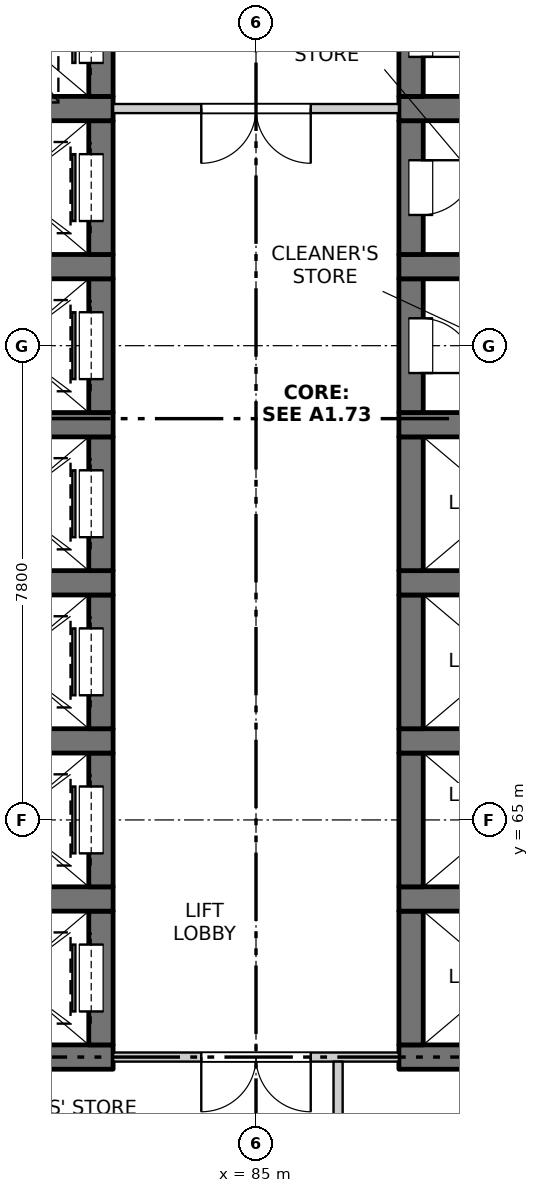
"""IFC4 building model, lengths in metres.
Left out: names, types, materials, properties, quantities, classifications, styles, units other than length and angle.
Written with IfcOpenShell. Run it as: python <this file> out.ifc"""

import sys

from ifc_helpers import new_model, si_unit, direction, frame, frame_2d, origin, place, context, subcontext, project, spatial, rectangle, extrude, element, fill, save


model = new_model("IFC4")
c1 = context("Model", 3, precision=1e-05, world=origin(), true_north=direction((0.0, 1.0)))
c2 = subcontext(c1, "Body", "Model", "MODEL_VIEW")
j1 = project(units=[si_unit("LENGTHUNIT", "METRE"), si_unit("PLANEANGLEUNIT", "RADIAN")], contexts=[c1])
p1 = place(None, origin())
s1 = spatial("IfcSite", under=j1, at=p1, CompositionType="ELEMENT")
p2 = place(p1, origin())
s2 = spatial("IfcBuilding", under=s1, at=p2, CompositionType="ELEMENT")
p3 = place(p2, frame((0.0, 0.0, 19.5)))
s3 = spatial("IfcBuildingStorey", under=s2, at=p3, CompositionType="ELEMENT", Elevation=19.5)
p4 = place(p3, frame((79.65, 61.1, -0.25), z_axis=(0.0, 0.0, 1.0), x_axis=(1.0, 0.0, 0.0)))
e1 = element("IfcWall", 1, at=p4, inside=s3, PredefinedType="SOLIDWALL", context=c2, shape_type="SweptSolid", body=[
    extrude(rectangle(XDim=3.0, YDim=0.4, at=frame_2d((1.5, 0.0))), origin(), (0.0, 0.0, 1.0), 3.4),
])
p5 = place(p3, frame((82.45, 61.3, -0.25), z_axis=(0.0, 0.0, 1.0), x_axis=(0.0, 1.0, 0.0)))
e2 = element("IfcWall", 2, at=p5, inside=s3, PredefinedType="SOLIDWALL", context=c2, shape_type="SweptSolid", body=[
    extrude(rectangle(XDim=2.2, YDim=0.4, at=frame_2d((1.1, 0.0))), origin(), (0.0, 0.0, 1.0), 3.4),
])
p6 = place(p5, frame((0.55, 0.0, 0.25)))
e3 = element("IfcOpeningElement", 3, at=p6, cuts=e2, PredefinedType="OPENING", context=c2, shape_type="SweptSolid", body=[
    extrude(rectangle(XDim=1.1, YDim=2.1, at=frame_2d((0.55, 1.05))), frame((0.0, 0.21, 0.0), z_axis=(0.0, -1.0, 0.0), x_axis=(1.0, 0.0, 0.0)), (0.0, 0.0, 1.0), 0.42),
])
p7 = place(p3, frame((79.65, 63.7, -0.25), z_axis=(0.0, 0.0, 1.0), x_axis=(1.0, 0.0, 0.0)))
e4 = element("IfcWall", 4, at=p7, inside=s3, PredefinedType="SOLIDWALL", context=c2, shape_type="SweptSolid", body=[
    extrude(rectangle(XDim=3.0, YDim=0.4, at=frame_2d((1.5, 0.0))), origin(), (0.0, 0.0, 1.0), 3.4),
])
p8 = place(p3, frame((82.45, 63.9, -0.25), z_axis=(0.0, 0.0, 1.0), x_axis=(0.0, 1.0, 0.0)))
e5 = element("IfcWall", 5, at=p8, inside=s3, PredefinedType="SOLIDWALL", context=c2, shape_type="SweptSolid", body=[
    extrude(rectangle(XDim=2.2, YDim=0.4, at=frame_2d((1.1, 0.0))), origin(), (0.0, 0.0, 1.0), 3.4),
])
p9 = place(p8, frame((0.55, 0.0, 0.25)))
e6 = element("IfcOpeningElement", 6, at=p9, cuts=e5, PredefinedType="OPENING", context=c2, shape_type="SweptSolid", body=[
    extrude(rectangle(XDim=1.1, YDim=2.1, at=frame_2d((0.55, 1.05))), frame((0.0, 0.21, 0.0), z_axis=(0.0, -1.0, 0.0), x_axis=(1.0, 0.0, 0.0)), (0.0, 0.0, 1.0), 0.42),
])
p10 = place(p3, frame((79.65, 66.3, -0.25), z_axis=(0.0, 0.0, 1.0), x_axis=(1.0, 0.0, 0.0)))
e7 = element("IfcWall", 7, at=p10, inside=s3, PredefinedType="SOLIDWALL", context=c2, shape_type="SweptSolid", body=[
    extrude(rectangle(XDim=3.0, YDim=0.4, at=frame_2d((1.5, 0.0))), origin(), (0.0, 0.0, 1.0), 3.4),
])
p11 = place(p3, frame((82.45, 66.5, -0.25), z_axis=(0.0, 0.0, 1.0), x_axis=(0.0, 1.0, 0.0)))
e8 = element("IfcWall", 8, at=p11, inside=s3, PredefinedType="SOLIDWALL", context=c2, shape_type="SweptSolid", body=[
    extrude(rectangle(XDim=2.2, YDim=0.4, at=frame_2d((1.1, 0.0))), origin(), (0.0, 0.0, 1.0), 3.4),
])
p12 = place(p11, frame((0.55, 0.0, 0.25)))
e9 = element("IfcOpeningElement", 9, at=p12, cuts=e8, PredefinedType="OPENING", context=c2, shape_type="SweptSolid", body=[
    extrude(rectangle(XDim=1.1, YDim=2.1, at=frame_2d((0.55, 1.05))), frame((0.0, 0.21, 0.0), z_axis=(0.0, -1.0, 0.0), x_axis=(1.0, 0.0, 0.0)), (0.0, 0.0, 1.0), 0.42),
])
p13 = place(p3, frame((79.65, 68.9, -0.25), z_axis=(0.0, 0.0, 1.0), x_axis=(1.0, 0.0, 0.0)))
e10 = element("IfcWall", 10, at=p13, inside=s3, PredefinedType="SOLIDWALL", context=c2, shape_type="SweptSolid", body=[
    extrude(rectangle(XDim=3.0, YDim=0.4, at=frame_2d((1.5, 0.0))), origin(), (0.0, 0.0, 1.0), 3.4),
])
p14 = place(p3, frame((82.45, 69.1, -0.25), z_axis=(0.0, 0.0, 1.0), x_axis=(0.0, 1.0, 0.0)))
e11 = element("IfcWall", 11, at=p14, inside=s3, PredefinedType="SOLIDWALL", context=c2, shape_type="SweptSolid", body=[
    extrude(rectangle(XDim=2.2, YDim=0.4, at=frame_2d((1.1, 0.0))), origin(), (0.0, 0.0, 1.0), 3.4),
])
p15 = place(p14, frame((0.55, 0.0, 0.25)))
e12 = element("IfcOpeningElement", 12, at=p15, cuts=e11, PredefinedType="OPENING", context=c2, shape_type="SweptSolid", body=[
    extrude(rectangle(XDim=1.1, YDim=2.1, at=frame_2d((0.55, 1.05))), frame((0.0, 0.21, 0.0), z_axis=(0.0, -1.0, 0.0), x_axis=(1.0, 0.0, 0.0)), (0.0, 0.0, 1.0), 0.42),
])
p16 = place(p3, frame((79.65, 71.5, -0.25), z_axis=(0.0, 0.0, 1.0), x_axis=(1.0, 0.0, 0.0)))
e13 = element("IfcWall", 13, at=p16, inside=s3, PredefinedType="SOLIDWALL", context=c2, shape_type="SweptSolid", body=[
    extrude(rectangle(XDim=3.0, YDim=0.4, at=frame_2d((1.5, 0.0))), origin(), (0.0, 0.0, 1.0), 3.4),
])
p17 = place(p3, frame((82.45, 71.7, -0.25), z_axis=(0.0, 0.0, 1.0), x_axis=(0.0, 1.0, 0.0)))
e14 = element("IfcWall", 14, at=p17, inside=s3, PredefinedType="SOLIDWALL", context=c2, shape_type="SweptSolid", body=[
    extrude(rectangle(XDim=2.2, YDim=0.4, at=frame_2d((1.1, 0.0))), origin(), (0.0, 0.0, 1.0), 3.4),
])
p18 = place(p17, frame((0.55, 0.0, 0.25)))
e15 = element("IfcOpeningElement", 15, at=p18, cuts=e14, PredefinedType="OPENING", context=c2, shape_type="SweptSolid", body=[
    extrude(rectangle(XDim=1.1, YDim=2.1, at=frame_2d((0.55, 1.05))), frame((0.0, 0.21, 0.0), z_axis=(0.0, -1.0, 0.0), x_axis=(1.0, 0.0, 0.0)), (0.0, 0.0, 1.0), 0.42),
])
p19 = place(p3, frame((79.65, 74.1, -0.25), z_axis=(0.0, 0.0, 1.0), x_axis=(1.0, 0.0, 0.0)))
e16 = element("IfcWall", 16, at=p19, inside=s3, PredefinedType="SOLIDWALL", context=c2, shape_type="SweptSolid", body=[
    extrude(rectangle(XDim=3.0, YDim=0.4, at=frame_2d((1.5, 0.0))), origin(), (0.0, 0.0, 1.0), 3.4),
])
p20 = place(p3, frame((82.45, 74.3, -0.25), z_axis=(0.0, 0.0, 1.0), x_axis=(0.0, 1.0, 0.0)))
e17 = element("IfcWall", 17, at=p20, inside=s3, PredefinedType="SOLIDWALL", context=c2, shape_type="SweptSolid", body=[
    extrude(rectangle(XDim=2.2, YDim=0.4, at=frame_2d((1.1, 0.0))), origin(), (0.0, 0.0, 1.0), 3.4),
])
p21 = place(p20, frame((0.55, 0.0, 0.25)))
e18 = element("IfcOpeningElement", 18, at=p21, cuts=e17, PredefinedType="OPENING", context=c2, shape_type="SweptSolid", body=[
    extrude(rectangle(XDim=1.1, YDim=2.1, at=frame_2d((0.55, 1.05))), frame((0.0, 0.21, 0.0), z_axis=(0.0, -1.0, 0.0), x_axis=(1.0, 0.0, 0.0)), (0.0, 0.0, 1.0), 0.42),
])
p22 = place(p3, frame((79.65, 76.7, -0.25), z_axis=(0.0, 0.0, 1.0), x_axis=(1.0, 0.0, 0.0)))
e19 = element("IfcWall", 19, at=p22, inside=s3, PredefinedType="SOLIDWALL", context=c2, shape_type="SweptSolid", body=[
    extrude(rectangle(XDim=3.0, YDim=0.4, at=frame_2d((1.5, 0.0))), origin(), (0.0, 0.0, 1.0), 3.4),
])
p23 = place(p3, frame((82.45, 76.9, -0.25), z_axis=(0.0, 0.0, 1.0), x_axis=(0.0, 1.0, 0.0)))
e20 = element("IfcWall", 20, at=p23, inside=s3, PredefinedType="SOLIDWALL", context=c2, shape_type="SweptSolid", body=[
    extrude(rectangle(XDim=2.2, YDim=0.4, at=frame_2d((1.1, 0.0))), origin(), (0.0, 0.0, 1.0), 3.4),
])
p24 = place(p23, frame((0.55, 0.0, 0.25)))
e21 = element("IfcOpeningElement", 21, at=p24, cuts=e20, PredefinedType="OPENING", context=c2, shape_type="SweptSolid", body=[
    extrude(rectangle(XDim=1.1, YDim=2.1, at=frame_2d((0.55, 1.05))), frame((0.0, 0.21, 0.0), z_axis=(0.0, -1.0, 0.0), x_axis=(1.0, 0.0, 0.0)), (0.0, 0.0, 1.0), 0.42),
])
p25 = place(p3, frame((87.35, 61.1, -0.25), z_axis=(0.0, 0.0, 1.0), x_axis=(1.0, 0.0, 0.0)))
e22 = element("IfcWall", 22, at=p25, inside=s3, PredefinedType="SOLIDWALL", context=c2, shape_type="SweptSolid", body=[
    extrude(rectangle(XDim=3.0, YDim=0.4, at=frame_2d((1.5, 0.0))), origin(), (0.0, 0.0, 1.0), 3.4),
])
p26 = place(p3, frame((87.55, 61.3, -0.25), z_axis=(0.0, 0.0, 1.0), x_axis=(0.0, 1.0, 0.0)))
e23 = element("IfcWall", 23, at=p26, inside=s3, PredefinedType="SOLIDWALL", context=c2, shape_type="SweptSolid", body=[
    extrude(rectangle(XDim=2.2, YDim=0.4, at=frame_2d((1.1, 0.0))), origin(), (0.0, 0.0, 1.0), 3.4),
])
p27 = place(p3, frame((87.35, 63.7, -0.25), z_axis=(0.0, 0.0, 1.0), x_axis=(1.0, 0.0, 0.0)))
e24 = element("IfcWall", 24, at=p27, inside=s3, PredefinedType="SOLIDWALL", context=c2, shape_type="SweptSolid", body=[
    extrude(rectangle(XDim=3.0, YDim=0.4, at=frame_2d((1.5, 0.0))), origin(), (0.0, 0.0, 1.0), 3.4),
])
p28 = place(p3, frame((87.55, 63.9, -0.25), z_axis=(0.0, 0.0, 1.0), x_axis=(0.0, 1.0, 0.0)))
e25 = element("IfcWall", 25, at=p28, inside=s3, PredefinedType="SOLIDWALL", context=c2, shape_type="SweptSolid", body=[
    extrude(rectangle(XDim=2.2, YDim=0.4, at=frame_2d((1.1, 0.0))), origin(), (0.0, 0.0, 1.0), 3.4),
])
p29 = place(p3, frame((87.35, 66.3, -0.25), z_axis=(0.0, 0.0, 1.0), x_axis=(1.0, 0.0, 0.0)))
e26 = element("IfcWall", 26, at=p29, inside=s3, PredefinedType="SOLIDWALL", context=c2, shape_type="SweptSolid", body=[
    extrude(rectangle(XDim=3.0, YDim=0.4, at=frame_2d((1.5, 0.0))), origin(), (0.0, 0.0, 1.0), 3.4),
])
p30 = place(p3, frame((87.55, 66.5, -0.25), z_axis=(0.0, 0.0, 1.0), x_axis=(0.0, 1.0, 0.0)))
e27 = element("IfcWall", 27, at=p30, inside=s3, PredefinedType="SOLIDWALL", context=c2, shape_type="SweptSolid", body=[
    extrude(rectangle(XDim=2.2, YDim=0.4, at=frame_2d((1.1, 0.0))), origin(), (0.0, 0.0, 1.0), 3.4),
])
p31 = place(p3, frame((87.35, 68.9, -0.25), z_axis=(0.0, 0.0, 1.0), x_axis=(1.0, 0.0, 0.0)))
e28 = element("IfcWall", 28, at=p31, inside=s3, PredefinedType="SOLIDWALL", context=c2, shape_type="SweptSolid", body=[
    extrude(rectangle(XDim=3.0, YDim=0.4, at=frame_2d((1.5, 0.0))), origin(), (0.0, 0.0, 1.0), 3.4),
])
p32 = place(p3, frame((87.55, 69.1, -0.25), z_axis=(0.0, 0.0, 1.0), x_axis=(0.0, 1.0, 0.0)))
e29 = element("IfcWall", 29, at=p32, inside=s3, PredefinedType="SOLIDWALL", context=c2, shape_type="SweptSolid", body=[
    extrude(rectangle(XDim=2.2, YDim=0.4, at=frame_2d((1.1, 0.0))), origin(), (0.0, 0.0, 1.0), 3.4),
])
p33 = place(p3, frame((87.35, 71.5, -0.25), z_axis=(0.0, 0.0, 1.0), x_axis=(1.0, 0.0, 0.0)))
e30 = element("IfcWall", 30, at=p33, inside=s3, PredefinedType="SOLIDWALL", context=c2, shape_type="SweptSolid", body=[
    extrude(rectangle(XDim=3.0, YDim=0.4, at=frame_2d((1.5, 0.0))), origin(), (0.0, 0.0, 1.0), 3.4),
])
p34 = place(p3, frame((87.55, 71.7, -0.25), z_axis=(0.0, 0.0, 1.0), x_axis=(0.0, 1.0, 0.0)))
e31 = element("IfcWall", 31, at=p34, inside=s3, PredefinedType="SOLIDWALL", context=c2, shape_type="SweptSolid", body=[
    extrude(rectangle(XDim=2.2, YDim=0.4, at=frame_2d((1.1, 0.0))), origin(), (0.0, 0.0, 1.0), 3.4),
])
p35 = place(p34, frame((0.65, 0.0, 0.25)))
e32 = element("IfcOpeningElement", 32, at=p35, cuts=e31, PredefinedType="OPENING", context=c2, shape_type="SweptSolid", body=[
    extrude(rectangle(XDim=0.9, YDim=2.1, at=frame_2d((0.45, 1.05))), frame((0.0, 0.21, 0.0), z_axis=(0.0, -1.0, 0.0), x_axis=(1.0, 0.0, 0.0)), (0.0, 0.0, 1.0), 0.42),
])
p36 = place(p3, frame((87.35, 74.1, -0.25), z_axis=(0.0, 0.0, 1.0), x_axis=(1.0, 0.0, 0.0)))
e33 = element("IfcWall", 33, at=p36, inside=s3, PredefinedType="SOLIDWALL", context=c2, shape_type="SweptSolid", body=[
    extrude(rectangle(XDim=3.0, YDim=0.4, at=frame_2d((1.5, 0.0))), origin(), (0.0, 0.0, 1.0), 3.4),
])
p37 = place(p3, frame((87.55, 74.3, -0.25), z_axis=(0.0, 0.0, 1.0), x_axis=(0.0, 1.0, 0.0)))
e34 = element("IfcWall", 34, at=p37, inside=s3, PredefinedType="SOLIDWALL", context=c2, shape_type="SweptSolid", body=[
    extrude(rectangle(XDim=2.2, YDim=0.4, at=frame_2d((1.1, 0.0))), origin(), (0.0, 0.0, 1.0), 3.4),
])
p38 = place(p37, frame((0.65, 0.0, 0.25)))
e35 = element("IfcOpeningElement", 35, at=p38, cuts=e34, PredefinedType="OPENING", context=c2, shape_type="SweptSolid", body=[
    extrude(rectangle(XDim=0.9, YDim=2.1, at=frame_2d((0.45, 1.05))), frame((0.0, 0.21, 0.0), z_axis=(0.0, -1.0, 0.0), x_axis=(1.0, 0.0, 0.0)), (0.0, 0.0, 1.0), 0.42),
])
p39 = place(p3, frame((87.35, 76.7, -0.25), z_axis=(0.0, 0.0, 1.0), x_axis=(1.0, 0.0, 0.0)))
e36 = element("IfcWall", 36, at=p39, inside=s3, PredefinedType="SOLIDWALL", context=c2, shape_type="SweptSolid", body=[
    extrude(rectangle(XDim=3.0, YDim=0.4, at=frame_2d((1.5, 0.0))), origin(), (0.0, 0.0, 1.0), 3.4),
])
p40 = place(p3, frame((87.55, 76.9, -0.25), z_axis=(0.0, 0.0, 1.0), x_axis=(0.0, 1.0, 0.0)))
e37 = element("IfcWall", 37, at=p40, inside=s3, PredefinedType="SOLIDWALL", context=c2, shape_type="SweptSolid", body=[
    extrude(rectangle(XDim=2.2, YDim=0.4, at=frame_2d((1.1, 0.0))), origin(), (0.0, 0.0, 1.0), 3.4),
])
p41 = place(p40, frame((0.65, 0.0, 0.25)))
e38 = element("IfcOpeningElement", 38, at=p41, cuts=e37, PredefinedType="OPENING", context=c2, shape_type="SweptSolid", body=[
    extrude(rectangle(XDim=0.9, YDim=2.1, at=frame_2d((0.45, 1.05))), frame((0.0, 0.21, 0.0), z_axis=(0.0, -1.0, 0.0), x_axis=(1.0, 0.0, 0.0)), (0.0, 0.0, 1.0), 0.42),
])
p42 = place(p3, frame((82.65, 61.1, 0.0), z_axis=(0.0, 0.0, 1.0), x_axis=(1.0, 0.0, 0.0)))
e39 = element("IfcWall", 39, at=p42, inside=s3, PredefinedType="PARTITIONING", context=c2, shape_type="SweptSolid", body=[
    extrude(rectangle(XDim=4.7, YDim=0.15, at=frame_2d((2.35, 0.0))), origin(), (0.0, 0.0, 1.0), 3.15),
])
p43 = place(p42, frame((1.45, 0.0, 0.0)))
e40 = element("IfcOpeningElement", 40, at=p43, cuts=e39, PredefinedType="OPENING", context=c2, shape_type="SweptSolid", body=[
    extrude(rectangle(XDim=1.8, YDim=2.1, at=frame_2d((0.9, 1.05))), frame((0.0, 0.085, 0.0), z_axis=(0.0, -1.0, 0.0), x_axis=(1.0, 0.0, 0.0)), (0.0, 0.0, 1.0), 0.17),
])
p44 = place(p3, frame((82.65, 76.7, 0.0), z_axis=(0.0, 0.0, 1.0), x_axis=(1.0, 0.0, 0.0)))
e41 = element("IfcWall", 41, at=p44, inside=s3, PredefinedType="PARTITIONING", context=c2, shape_type="SweptSolid", body=[
    extrude(rectangle(XDim=4.7, YDim=0.15, at=frame_2d((2.35, 0.0))), origin(), (0.0, 0.0, 1.0), 3.15),
])
p45 = place(p44, frame((1.45, 0.0, 0.0)))
e42 = element("IfcOpeningElement", 42, at=p45, cuts=e41, PredefinedType="OPENING", context=c2, shape_type="SweptSolid", body=[
    extrude(rectangle(XDim=1.8, YDim=2.1, at=frame_2d((0.9, 1.05))), frame((0.0, 0.085, 0.0), z_axis=(0.0, -1.0, 0.0), x_axis=(1.0, 0.0, 0.0)), (0.0, 0.0, 1.0), 0.17),
])
p46 = place(p3, frame((86.35, 55.6, 0.0), z_axis=(0.0, 0.0, 1.0), x_axis=(0.0, 1.0, 0.0)))
e43 = element("IfcWall", 43, at=p46, inside=s3, PredefinedType="PARTITIONING", context=c2, shape_type="SweptSolid", body=[
    extrude(rectangle(XDim=5.425, YDim=0.15, at=frame_2d((2.712, 0.0))), origin(), (0.0, 0.0, 1.0), 3.15),
])
p47 = place(p46, frame((2.1, 0.0, 0.0)))
e44 = element("IfcOpeningElement", 44, at=p47, cuts=e43, PredefinedType="OPENING", context=c2, shape_type="SweptSolid", body=[
    extrude(rectangle(XDim=0.9, YDim=2.1, at=frame_2d((0.45, 1.05))), frame((0.0, 0.085, 0.0), z_axis=(0.0, -1.0, 0.0), x_axis=(1.0, 0.0, 0.0)), (0.0, 0.0, 1.0), 0.17),
])
p48 = place(p43, origin())
e45 = element("IfcDoor", 45, at=p48, inside=s3, OperationType="DOUBLE_DOOR_SINGLE_SWING", PredefinedType="DOOR", context=c2, shape_type="SweptSolid", body=[
    extrude(rectangle(XDim=1.8, YDim=2.1, at=frame_2d((0.9, 1.05))), frame((0.0, 0.025, 0.0), z_axis=(0.0, -1.0, 0.0), x_axis=(1.0, 0.0, 0.0)), (0.0, 0.0, 1.0), 0.05),
])
fill(e40, e45)
p49 = place(p6, origin())
e46 = element("IfcDoor", 46, at=p49, inside=s3, OperationType="SLIDING_TO_RIGHT", PredefinedType="DOOR", context=c2, shape_type="SweptSolid", body=[
    extrude(rectangle(XDim=1.1, YDim=2.1, at=frame_2d((0.55, 1.05))), frame((0.0, 0.185, 0.0), z_axis=(0.0, -1.0, 0.0), x_axis=(1.0, 0.0, 0.0)), (0.0, 0.0, 1.0), 0.05),
])
fill(e3, e46)
p50 = place(p9, origin())
e47 = element("IfcDoor", 47, at=p50, inside=s3, OperationType="SLIDING_TO_RIGHT", PredefinedType="DOOR", context=c2, shape_type="SweptSolid", body=[
    extrude(rectangle(XDim=1.1, YDim=2.1, at=frame_2d((0.55, 1.05))), frame((0.0, 0.185, 0.0), z_axis=(0.0, -1.0, 0.0), x_axis=(1.0, 0.0, 0.0)), (0.0, 0.0, 1.0), 0.05),
])
fill(e6, e47)
p51 = place(p12, origin())
e48 = element("IfcDoor", 48, at=p51, inside=s3, OperationType="SLIDING_TO_RIGHT", PredefinedType="DOOR", context=c2, shape_type="SweptSolid", body=[
    extrude(rectangle(XDim=1.1, YDim=2.1, at=frame_2d((0.55, 1.05))), frame((0.0, 0.185, 0.0), z_axis=(0.0, -1.0, 0.0), x_axis=(1.0, 0.0, 0.0)), (0.0, 0.0, 1.0), 0.05),
])
fill(e9, e48)
p52 = place(p15, origin())
e49 = element("IfcDoor", 49, at=p52, inside=s3, OperationType="SLIDING_TO_LEFT", PredefinedType="DOOR", context=c2, shape_type="SweptSolid", body=[
    extrude(rectangle(XDim=1.1, YDim=2.1, at=frame_2d((0.55, 1.05))), frame((0.0, 0.185, 0.0), z_axis=(0.0, -1.0, 0.0), x_axis=(1.0, 0.0, 0.0)), (0.0, 0.0, 1.0), 0.05),
])
fill(e12, e49)
p53 = place(p18, origin())
e50 = element("IfcDoor", 50, at=p53, inside=s3, OperationType="SLIDING_TO_LEFT", PredefinedType="DOOR", context=c2, shape_type="SweptSolid", body=[
    extrude(rectangle(XDim=1.1, YDim=2.1, at=frame_2d((0.55, 1.05))), frame((0.0, 0.185, 0.0), z_axis=(0.0, -1.0, 0.0), x_axis=(1.0, 0.0, 0.0)), (0.0, 0.0, 1.0), 0.05),
])
fill(e15, e50)
p54 = place(p35, origin())
e51 = element("IfcDoor", 51, at=p54, inside=s3, OperationType="SINGLE_SWING_RIGHT", PredefinedType="DOOR", context=c2, shape_type="SweptSolid", body=[
    extrude(rectangle(XDim=0.9, YDim=2.1, at=frame_2d((0.45, 1.05))), frame((0.0, -0.135, 0.0), z_axis=(0.0, -1.0, 0.0), x_axis=(1.0, 0.0, 0.0)), (0.0, 0.0, 1.0), 0.05),
])
fill(e32, e51)
p55 = place(p21, origin())
e52 = element("IfcDoor", 52, at=p55, inside=s3, OperationType="SLIDING_TO_LEFT", PredefinedType="DOOR", context=c2, shape_type="SweptSolid", body=[
    extrude(rectangle(XDim=1.1, YDim=2.1, at=frame_2d((0.55, 1.05))), frame((0.0, 0.185, 0.0), z_axis=(0.0, -1.0, 0.0), x_axis=(1.0, 0.0, 0.0)), (0.0, 0.0, 1.0), 0.05),
])
fill(e18, e52)
p56 = place(p38, origin())
e53 = element("IfcDoor", 53, at=p56, inside=s3, OperationType="SINGLE_SWING_LEFT", PredefinedType="DOOR", context=c2, shape_type="SweptSolid", body=[
    extrude(rectangle(XDim=0.9, YDim=2.1, at=frame_2d((0.45, 1.05))), frame((0.0, -0.135, 0.0), z_axis=(0.0, -1.0, 0.0), x_axis=(1.0, 0.0, 0.0)), (0.0, 0.0, 1.0), 0.05),
])
fill(e35, e53)
p57 = place(p45, origin())
e54 = element("IfcDoor", 54, at=p57, inside=s3, OperationType="DOUBLE_DOOR_SINGLE_SWING", PredefinedType="DOOR", context=c2, shape_type="SweptSolid", body=[
    extrude(rectangle(XDim=1.8, YDim=2.1, at=frame_2d((0.9, 1.05))), frame((0.0, 0.025, 0.0), z_axis=(0.0, -1.0, 0.0), x_axis=(1.0, 0.0, 0.0)), (0.0, 0.0, 1.0), 0.05),
])
fill(e42, e54)
p58 = place(p24, origin())
e55 = element("IfcDoor", 55, at=p58, inside=s3, OperationType="SLIDING_TO_LEFT", PredefinedType="DOOR", context=c2, shape_type="SweptSolid", body=[
    extrude(rectangle(XDim=1.1, YDim=2.1, at=frame_2d((0.55, 1.05))), frame((0.0, 0.185, 0.0), z_axis=(0.0, -1.0, 0.0), x_axis=(1.0, 0.0, 0.0)), (0.0, 0.0, 1.0), 0.05),
])
fill(e21, e55)
p59 = place(p41, origin())
e56 = element("IfcDoor", 56, at=p59, inside=s3, OperationType="SINGLE_SWING_RIGHT", PredefinedType="DOOR", context=c2, shape_type="SweptSolid", body=[
    extrude(rectangle(XDim=0.9, YDim=2.1, at=frame_2d((0.45, 1.05))), frame((0.0, -0.135, 0.0), z_axis=(0.0, -1.0, 0.0), x_axis=(1.0, 0.0, 0.0)), (0.0, 0.0, 1.0), 0.05),
])
fill(e38, e56)
save(model, sys.argv[1])
